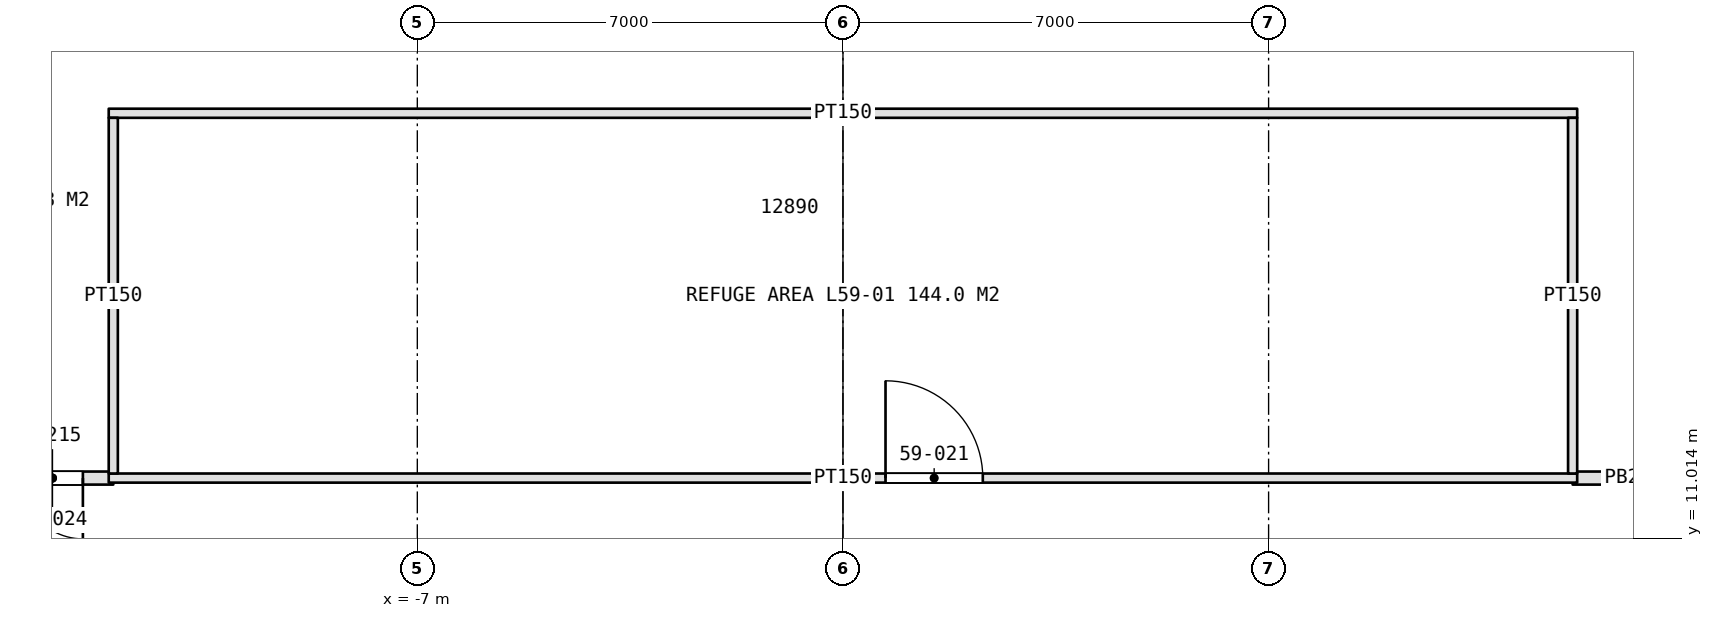
"""IFC4 building model, lengths in metres.
Left out: names, types, materials, properties, quantities, classifications, styles, units other than length and angle.
Written with IfcOpenShell. Run it as: python <this file> out.ifc"""

import sys

from ifc_helpers import new_model, si_unit, direction, frame, frame_2d, origin, place, context, subcontext, project, spatial, rectangle, extrude, element, fill, save


model = new_model("IFC4")
c1 = context("Model", 3, precision=1e-05, world=origin(), true_north=direction((0.0, 1.0)))
c2 = subcontext(c1, "Body", "Model", "MODEL_VIEW")
j1 = project(units=[si_unit("LENGTHUNIT", "METRE"), si_unit("PLANEANGLEUNIT", "RADIAN")], contexts=[c1])
p1 = place(None, origin())
s1 = spatial("IfcSite", under=j1, at=p1, CompositionType="ELEMENT")
p2 = place(p1, origin())
s2 = spatial("IfcBuilding", under=s1, at=p2, CompositionType="ELEMENT")
p3 = place(p2, frame((0.0, 0.0, 266.2)))
s3 = spatial("IfcBuildingStorey", under=s2, at=p3, CompositionType="ELEMENT", Elevation=266.2)
p4 = place(p3, frame((-12.0, 12.0, 0.0), z_axis=(0.0, 0.0, 1.0), x_axis=(-1.0, 0.0, 0.0)))
e1 = element("IfcWall", 1, at=p4, inside=s3, PredefinedType="PARTITIONING", context=c2, shape_type="SweptSolid", body=[
    extrude(rectangle(XDim=2.0, YDim=0.215, at=frame_2d((1.0, 0.0))), origin(), (0.0, 0.0, 1.0), 4.2),
])
p5 = place(p4, frame((0.5, 0.0, 0.0)))
e2 = element("IfcOpeningElement", 2, at=p5, cuts=e1, PredefinedType="OPENING", context=c2, shape_type="SweptSolid", body=[
    extrude(rectangle(XDim=1.0, YDim=2.2, at=frame_2d((0.5, 1.1))), frame((0.0, 0.118, 0.0), z_axis=(0.0, -1.0, 0.0), x_axis=(1.0, 0.0, 0.0)), (0.0, 0.0, 1.0), 0.235),
])
p6 = place(p3, frame((14.0, 12.0, 0.0), z_axis=(0.0, 0.0, 1.0), x_axis=(-1.0, 0.0, 0.0)))
e3 = element("IfcWall", 3, at=p6, inside=s3, PredefinedType="PARTITIONING", context=c2, shape_type="SweptSolid", body=[
    extrude(rectangle(XDim=2.0, YDim=0.215, at=frame_2d((1.0, 0.0))), origin(), (0.0, 0.0, 1.0), 4.2),
])
p7 = place(p3, frame((-12.075, 12.0, 0.0), z_axis=(0.0, 0.0, 1.0), x_axis=(1.0, 0.0, 0.0)))
e4 = element("IfcWall", 4, at=p7, inside=s3, PredefinedType="PARTITIONING", context=c2, shape_type="SweptSolid", body=[
    extrude(rectangle(XDim=24.15, YDim=0.15, at=frame_2d((12.075, 0.0))), origin(), (0.0, 0.0, 1.0), 4.2),
])
p8 = place(p7, frame((12.775, 0.0, 0.0)))
e5 = element("IfcOpeningElement", 5, at=p8, cuts=e4, PredefinedType="OPENING", context=c2, shape_type="SweptSolid", body=[
    extrude(rectangle(XDim=1.6, YDim=2.4, at=frame_2d((0.8, 1.2))), frame((0.0, 0.085, 0.0), z_axis=(0.0, -1.0, 0.0), x_axis=(1.0, 0.0, 0.0)), (0.0, 0.0, 1.0), 0.17),
])
p9 = place(p3, frame((-12.075, 18.0, 0.0), z_axis=(0.0, 0.0, 1.0), x_axis=(1.0, 0.0, 0.0)))
e6 = element("IfcWall", 6, at=p9, inside=s3, PredefinedType="PARTITIONING", context=c2, shape_type="SweptSolid", body=[
    extrude(rectangle(XDim=24.15, YDim=0.15, at=frame_2d((12.075, 0.0))), origin(), (0.0, 0.0, 1.0), 4.2),
])
for number, where, z_axis, x_axis in (
    (7, (-12.0, 12.075, 0.0), (0.0, 0.0, 1.0), (0.0, 1.0, 0.0)),
    (8, (12.0, 12.075, 0.0), (0.0, 0.0, 1.0), (0.0, 1.0, 0.0)),
):
    element("IfcWall", number, at=place(p3, frame(where, z_axis=z_axis, x_axis=x_axis)), inside=s3, PredefinedType="PARTITIONING", context=c2, shape_type="SweptSolid", body=[
        extrude(rectangle(XDim=5.85, YDim=0.15, at=frame_2d((2.925, 0.0))), origin(), (0.0, 0.0, 1.0), 4.2),
    ])
p10 = place(p8, origin())
e9 = element("IfcDoor", 9, at=p10, inside=s3, OperationType="DOUBLE_DOOR_SINGLE_SWING", PredefinedType="DOOR", context=c2, shape_type="SweptSolid", body=[
    extrude(rectangle(XDim=1.6, YDim=2.4, at=frame_2d((0.8, 1.2))), frame((0.0, 0.025, 0.0), z_axis=(0.0, -1.0, 0.0), x_axis=(1.0, 0.0, 0.0)), (0.0, 0.0, 1.0), 0.05),
])
fill(e5, e9)
p11 = place(p5, origin())
e10 = element("IfcDoor", 10, at=p11, inside=s3, OperationType="SINGLE_SWING_LEFT", PredefinedType="DOOR", context=c2, shape_type="SweptSolid", body=[
    extrude(rectangle(XDim=1.0, YDim=2.2, at=frame_2d((0.5, 1.1))), frame((0.0, 0.025, 0.0), z_axis=(0.0, -1.0, 0.0), x_axis=(1.0, 0.0, 0.0)), (0.0, 0.0, 1.0), 0.05),
])
fill(e2, e10)
save(model, sys.argv[1])
